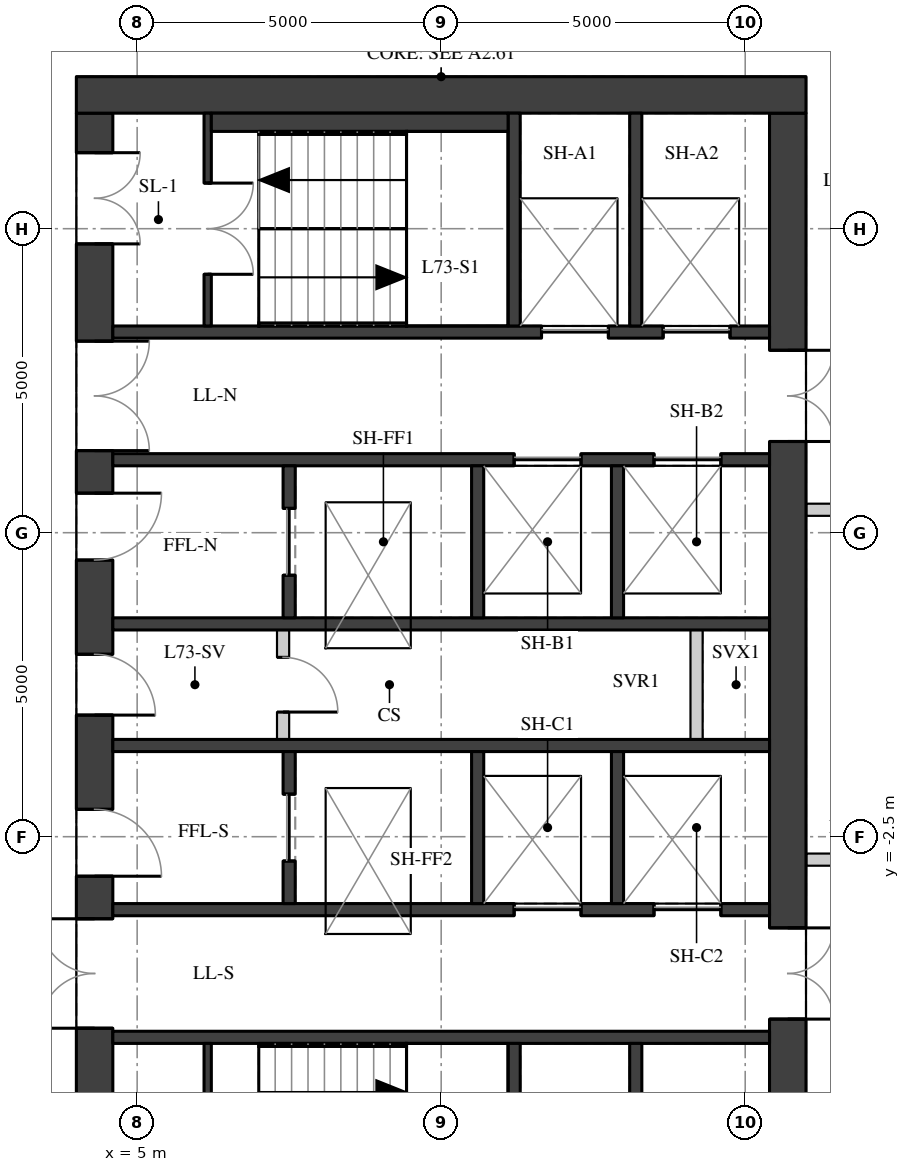
"""IFC4 building model, lengths in metres.
Left out: names, types, materials, properties, quantities, classifications, styles, units other than length and angle.
Written with IfcOpenShell. Run it as: python <this file> out.ifc"""

import sys

from ifc_helpers import new_model, si_unit, direction, frame, frame_2d, origin, place, context, subcontext, project, spatial, rectangle, extrude, element, fill, save


model = new_model("IFC4")
c1 = context("Model", 3, precision=1e-05, world=origin(), true_north=direction((0.0, 1.0)))
c2 = subcontext(c1, "Body", "Model", "MODEL_VIEW")
j1 = project(units=[si_unit("LENGTHUNIT", "METRE"), si_unit("PLANEANGLEUNIT", "RADIAN")], contexts=[c1])
p1 = place(None, origin())
s1 = spatial("IfcSite", under=j1, at=p1, CompositionType="ELEMENT")
p2 = place(p1, origin())
s2 = spatial("IfcBuilding", under=s1, at=p2, CompositionType="ELEMENT")
p3 = place(p2, frame((0.0, 0.0, 256.4)))
s3 = spatial("IfcBuildingStorey", under=s2, at=p3, CompositionType="ELEMENT", Elevation=256.4)
p4 = place(p3, frame((4.3, -9.4, 0.0), z_axis=(0.0, 0.0, 1.0), x_axis=(0.0, 1.0, 0.0)))
e1 = element("IfcWall", 1, at=p4, inside=s3, PredefinedType="SHEAR", context=c2, shape_type="SweptSolid", body=[
    extrude(rectangle(XDim=18.8, YDim=0.6, at=frame_2d((9.4, 0.0))), origin(), (0.0, 0.0, 1.0), 2.95),
])
p5 = place(p4, frame((0.65, 0.0, 0.0)))
e2 = element("IfcOpeningElement", 2, at=p5, cuts=e1, PredefinedType="OPENING", context=c2, shape_type="SweptSolid", body=[
    extrude(rectangle(XDim=1.5, YDim=2.1, at=frame_2d((0.75, 1.05))), frame((0.0, 0.31, 0.0), z_axis=(0.0, -1.0, 0.0), x_axis=(1.0, 0.0, 0.0)), (0.0, 0.0, 1.0), 0.62),
])
p6 = place(p4, frame((3.75, 0.0, 0.0)))
e3 = element("IfcOpeningElement", 3, at=p6, cuts=e1, PredefinedType="OPENING", context=c2, shape_type="SweptSolid", body=[
    extrude(rectangle(XDim=1.8, YDim=2.1, at=frame_2d((0.9, 1.05))), frame((0.0, 0.31, 0.0), z_axis=(0.0, -1.0, 0.0), x_axis=(1.0, 0.0, 0.0)), (0.0, 0.0, 1.0), 0.62),
])
p7 = place(p4, frame((6.25, 0.0, 0.0)))
e4 = element("IfcOpeningElement", 4, at=p7, cuts=e1, PredefinedType="OPENING", context=c2, shape_type="SweptSolid", body=[
    extrude(rectangle(XDim=1.1, YDim=2.1, at=frame_2d((0.55, 1.05))), frame((0.0, 0.31, 0.0), z_axis=(0.0, -1.0, 0.0), x_axis=(1.0, 0.0, 0.0)), (0.0, 0.0, 1.0), 0.62),
])
p8 = place(p4, frame((8.9, 0.0, 0.0)))
e5 = element("IfcOpeningElement", 5, at=p8, cuts=e1, PredefinedType="OPENING", context=c2, shape_type="SweptSolid", body=[
    extrude(rectangle(XDim=1.0, YDim=2.1, at=frame_2d((0.5, 1.05))), frame((0.0, 0.31, 0.0), z_axis=(0.0, -1.0, 0.0), x_axis=(1.0, 0.0, 0.0)), (0.0, 0.0, 1.0), 0.62),
])
p9 = place(p4, frame((11.45, 0.0, 0.0)))
e6 = element("IfcOpeningElement", 6, at=p9, cuts=e1, PredefinedType="OPENING", context=c2, shape_type="SweptSolid", body=[
    extrude(rectangle(XDim=1.1, YDim=2.1, at=frame_2d((0.55, 1.05))), frame((0.0, 0.31, 0.0), z_axis=(0.0, -1.0, 0.0), x_axis=(1.0, 0.0, 0.0)), (0.0, 0.0, 1.0), 0.62),
])
p10 = place(p4, frame((13.25, 0.0, 0.0)))
e7 = element("IfcOpeningElement", 7, at=p10, cuts=e1, PredefinedType="OPENING", context=c2, shape_type="SweptSolid", body=[
    extrude(rectangle(XDim=1.8, YDim=2.1, at=frame_2d((0.9, 1.05))), frame((0.0, 0.31, 0.0), z_axis=(0.0, -1.0, 0.0), x_axis=(1.0, 0.0, 0.0)), (0.0, 0.0, 1.0), 0.62),
])
p11 = place(p4, frame((16.65, 0.0, 0.0)))
e8 = element("IfcOpeningElement", 8, at=p11, cuts=e1, PredefinedType="OPENING", context=c2, shape_type="SweptSolid", body=[
    extrude(rectangle(XDim=1.5, YDim=2.1, at=frame_2d((0.75, 1.05))), frame((0.0, 0.31, 0.0), z_axis=(0.0, -1.0, 0.0), x_axis=(1.0, 0.0, 0.0)), (0.0, 0.0, 1.0), 0.62),
])
p12 = place(p3, frame((15.7, -9.4, 0.0), z_axis=(0.0, 0.0, 1.0), x_axis=(0.0, 1.0, 0.0)))
e9 = element("IfcWall", 9, at=p12, inside=s3, PredefinedType="SHEAR", context=c2, shape_type="SweptSolid", body=[
    extrude(rectangle(XDim=18.8, YDim=0.6, at=frame_2d((9.4, 0.0))), origin(), (0.0, 0.0, 1.0), 2.95),
])
p13 = place(p12, frame((13.4, 0.0, 0.0)))
e10 = element("IfcOpeningElement", 10, at=p13, cuts=e9, PredefinedType="OPENING", context=c2, shape_type="SweptSolid", body=[
    extrude(rectangle(XDim=1.5, YDim=2.1, at=frame_2d((0.75, 1.05))), frame((0.0, 0.31, 0.0), z_axis=(0.0, -1.0, 0.0), x_axis=(1.0, 0.0, 0.0)), (0.0, 0.0, 1.0), 0.62),
])
p14 = place(p12, frame((3.9, 0.0, 0.0)))
e11 = element("IfcOpeningElement", 11, at=p14, cuts=e9, PredefinedType="OPENING", context=c2, shape_type="SweptSolid", body=[
    extrude(rectangle(XDim=1.5, YDim=2.1, at=frame_2d((0.75, 1.05))), frame((0.0, 0.31, 0.0), z_axis=(0.0, -1.0, 0.0), x_axis=(1.0, 0.0, 0.0)), (0.0, 0.0, 1.0), 0.62),
])
p15 = place(p3, frame((4.0, 9.7, 0.0), z_axis=(0.0, 0.0, 1.0), x_axis=(1.0, 0.0, 0.0)))
e12 = element("IfcWall", 12, at=p15, inside=s3, PredefinedType="SHEAR", context=c2, shape_type="SweptSolid", body=[
    extrude(rectangle(XDim=12.0, YDim=0.6, at=frame_2d((6.0, 0.0))), origin(), (0.0, 0.0, 1.0), 2.95),
])
p16 = place(p3, frame((4.6, 5.8, 0.0), z_axis=(0.0, 0.0, 1.0), x_axis=(1.0, 0.0, 0.0)))
e13 = element("IfcWall", 13, at=p16, inside=s3, PredefinedType="SHEAR", context=c2, shape_type="SweptSolid", body=[
    extrude(rectangle(XDim=10.8, YDim=0.2, at=frame_2d((5.4, 0.0))), origin(), (0.0, 0.0, 1.0), 2.95),
])
p17 = place(p16, frame((7.05, 0.0, 0.0)))
e14 = element("IfcOpeningElement", 14, at=p17, cuts=e13, PredefinedType="OPENING", context=c2, shape_type="SweptSolid", body=[
    extrude(rectangle(XDim=1.1, YDim=2.1, at=frame_2d((0.55, 1.05))), frame((0.0, 0.11, 0.0), z_axis=(0.0, -1.0, 0.0), x_axis=(1.0, 0.0, 0.0)), (0.0, 0.0, 1.0), 0.22),
])
p18 = place(p16, frame((9.05, 0.0, 0.0)))
e15 = element("IfcOpeningElement", 15, at=p18, cuts=e13, PredefinedType="OPENING", context=c2, shape_type="SweptSolid", body=[
    extrude(rectangle(XDim=1.1, YDim=2.1, at=frame_2d((0.55, 1.05))), frame((0.0, 0.11, 0.0), z_axis=(0.0, -1.0, 0.0), x_axis=(1.0, 0.0, 0.0)), (0.0, 0.0, 1.0), 0.22),
])
p19 = place(p3, frame((4.6, 3.7, 0.0), z_axis=(0.0, 0.0, 1.0), x_axis=(1.0, 0.0, 0.0)))
e16 = element("IfcWall", 16, at=p19, inside=s3, PredefinedType="SHEAR", context=c2, shape_type="SweptSolid", body=[
    extrude(rectangle(XDim=10.8, YDim=0.2, at=frame_2d((5.4, 0.0))), origin(), (0.0, 0.0, 1.0), 2.95),
])
p20 = place(p19, frame((6.6, 0.0, 0.0)))
e17 = element("IfcOpeningElement", 17, at=p20, cuts=e16, PredefinedType="OPENING", context=c2, shape_type="SweptSolid", body=[
    extrude(rectangle(XDim=1.1, YDim=2.1, at=frame_2d((0.55, 1.05))), frame((0.0, 0.11, 0.0), z_axis=(0.0, -1.0, 0.0), x_axis=(1.0, 0.0, 0.0)), (0.0, 0.0, 1.0), 0.22),
])
p21 = place(p19, frame((8.9, 0.0, 0.0)))
e18 = element("IfcOpeningElement", 18, at=p21, cuts=e16, PredefinedType="OPENING", context=c2, shape_type="SweptSolid", body=[
    extrude(rectangle(XDim=1.1, YDim=2.1, at=frame_2d((0.55, 1.05))), frame((0.0, 0.11, 0.0), z_axis=(0.0, -1.0, 0.0), x_axis=(1.0, 0.0, 0.0)), (0.0, 0.0, 1.0), 0.22),
])
for number, where, z_axis, x_axis in (
    (19, (4.6, 1.0, 0.0), (0.0, 0.0, 1.0), (1.0, 0.0, 0.0)),
    (20, (4.6, -1.0, 0.0), (0.0, 0.0, 1.0), (1.0, 0.0, 0.0)),
):
    element("IfcWall", number, at=place(p3, frame(where, z_axis=z_axis, x_axis=x_axis)), inside=s3, PredefinedType="SHEAR", context=c2, shape_type="SweptSolid", body=[
        extrude(rectangle(XDim=10.8, YDim=0.2, at=frame_2d((5.4, 0.0))), origin(), (0.0, 0.0, 1.0), 2.95),
    ])
p22 = place(p3, frame((4.6, -3.7, 0.0), z_axis=(0.0, 0.0, 1.0), x_axis=(1.0, 0.0, 0.0)))
e21 = element("IfcWall", 21, at=p22, inside=s3, PredefinedType="SHEAR", context=c2, shape_type="SweptSolid", body=[
    extrude(rectangle(XDim=10.8, YDim=0.2, at=frame_2d((5.4, 0.0))), origin(), (0.0, 0.0, 1.0), 2.95),
])
p23 = place(p22, frame((6.6, 0.0, 0.0)))
e22 = element("IfcOpeningElement", 22, at=p23, cuts=e21, PredefinedType="OPENING", context=c2, shape_type="SweptSolid", body=[
    extrude(rectangle(XDim=1.1, YDim=2.1, at=frame_2d((0.55, 1.05))), frame((0.0, 0.11, 0.0), z_axis=(0.0, -1.0, 0.0), x_axis=(1.0, 0.0, 0.0)), (0.0, 0.0, 1.0), 0.22),
])
p24 = place(p22, frame((8.9, 0.0, 0.0)))
e23 = element("IfcOpeningElement", 23, at=p24, cuts=e21, PredefinedType="OPENING", context=c2, shape_type="SweptSolid", body=[
    extrude(rectangle(XDim=1.1, YDim=2.1, at=frame_2d((0.55, 1.05))), frame((0.0, 0.11, 0.0), z_axis=(0.0, -1.0, 0.0), x_axis=(1.0, 0.0, 0.0)), (0.0, 0.0, 1.0), 0.22),
])
p25 = place(p3, frame((4.6, -5.8, 0.0), z_axis=(0.0, 0.0, 1.0), x_axis=(1.0, 0.0, 0.0)))
e24 = element("IfcWall", 24, at=p25, inside=s3, PredefinedType="SHEAR", context=c2, shape_type="SweptSolid", body=[
    extrude(rectangle(XDim=10.8, YDim=0.2, at=frame_2d((5.4, 0.0))), origin(), (0.0, 0.0, 1.0), 2.95),
])
for number, where, z_axis, x_axis in (
    (25, (11.2, 5.9, 0.0), (0.0, 0.0, 1.0), (0.0, 1.0, 0.0)),
    (26, (11.2, -9.4, 0.0), (0.0, 0.0, 1.0), (0.0, 1.0, 0.0)),
    (27, (13.2, 5.9, 0.0), (0.0, 0.0, 1.0), (0.0, 1.0, 0.0)),
    (28, (13.2, -9.4, 0.0), (0.0, 0.0, 1.0), (0.0, 1.0, 0.0)),
):
    element("IfcWall", number, at=place(p3, frame(where, z_axis=z_axis, x_axis=x_axis)), inside=s3, PredefinedType="SHEAR", context=c2, shape_type="SweptSolid", body=[
        extrude(rectangle(XDim=3.5, YDim=0.2, at=frame_2d((1.75, 0.0))), origin(), (0.0, 0.0, 1.0), 2.95),
    ])
p26 = place(p3, frame((7.5, 1.1, 0.0), z_axis=(0.0, 0.0, 1.0), x_axis=(0.0, 1.0, 0.0)))
e29 = element("IfcWall", 29, at=p26, inside=s3, PredefinedType="SHEAR", context=c2, shape_type="SweptSolid", body=[
    extrude(rectangle(XDim=2.5, YDim=0.2, at=frame_2d((1.25, 0.0))), origin(), (0.0, 0.0, 1.0), 2.95),
])
p27 = place(p26, frame((0.7, 0.0, 0.0)))
e30 = element("IfcOpeningElement", 30, at=p27, cuts=e29, PredefinedType="OPENING", context=c2, shape_type="SweptSolid", body=[
    extrude(rectangle(XDim=1.1, YDim=2.1, at=frame_2d((0.55, 1.05))), frame((0.0, 0.11, 0.0), z_axis=(0.0, -1.0, 0.0), x_axis=(1.0, 0.0, 0.0)), (0.0, 0.0, 1.0), 0.22),
])
p28 = place(p3, frame((7.5, -3.6, 0.0), z_axis=(0.0, 0.0, 1.0), x_axis=(0.0, 1.0, 0.0)))
e31 = element("IfcWall", 31, at=p28, inside=s3, PredefinedType="SHEAR", context=c2, shape_type="SweptSolid", body=[
    extrude(rectangle(XDim=2.5, YDim=0.2, at=frame_2d((1.25, 0.0))), origin(), (0.0, 0.0, 1.0), 2.95),
])
p29 = place(p28, frame((0.7, 0.0, 0.0)))
e32 = element("IfcOpeningElement", 32, at=p29, cuts=e31, PredefinedType="OPENING", context=c2, shape_type="SweptSolid", body=[
    extrude(rectangle(XDim=1.1, YDim=2.1, at=frame_2d((0.55, 1.05))), frame((0.0, 0.11, 0.0), z_axis=(0.0, -1.0, 0.0), x_axis=(1.0, 0.0, 0.0)), (0.0, 0.0, 1.0), 0.22),
])
for number, where, z_axis, x_axis in (
    (33, (10.6, 1.1, 0.0), (0.0, 0.0, 1.0), (0.0, 1.0, 0.0)),
    (34, (10.6, -3.6, 0.0), (0.0, 0.0, 1.0), (0.0, 1.0, 0.0)),
    (35, (12.9, 1.1, 0.0), (0.0, 0.0, 1.0), (0.0, 1.0, 0.0)),
    (36, (12.9, -3.6, 0.0), (0.0, 0.0, 1.0), (0.0, 1.0, 0.0)),
):
    element("IfcWall", number, at=place(p3, frame(where, z_axis=z_axis, x_axis=x_axis)), inside=s3, PredefinedType="SHEAR", context=c2, shape_type="SweptSolid", body=[
        extrude(rectangle(XDim=2.5, YDim=0.2, at=frame_2d((1.25, 0.0))), origin(), (0.0, 0.0, 1.0), 2.95),
    ])
p30 = place(p3, frame((6.16, 5.9, 0.0), z_axis=(0.0, 0.0, 1.0), x_axis=(0.0, 1.0, 0.0)))
e37 = element("IfcWall", 37, at=p30, inside=s3, PredefinedType="SHEAR", context=c2, shape_type="SweptSolid", body=[
    extrude(rectangle(XDim=3.5, YDim=0.12, at=frame_2d((1.75, 0.0))), origin(), (0.0, 0.0, 1.0), 2.95),
])
p31 = place(p30, frame((0.85, 0.0, 0.0)))
e38 = element("IfcOpeningElement", 38, at=p31, cuts=e37, PredefinedType="OPENING", context=c2, shape_type="SweptSolid", body=[
    extrude(rectangle(XDim=1.5, YDim=2.1, at=frame_2d((0.75, 1.05))), frame((0.0, 0.07, 0.0), z_axis=(0.0, -1.0, 0.0), x_axis=(1.0, 0.0, 0.0)), (0.0, 0.0, 1.0), 0.14),
])
p32 = place(p3, frame((6.16, -9.4, 0.0), z_axis=(0.0, 0.0, 1.0), x_axis=(0.0, 1.0, 0.0)))
e39 = element("IfcWall", 39, at=p32, inside=s3, PredefinedType="SHEAR", context=c2, shape_type="SweptSolid", body=[
    extrude(rectangle(XDim=3.5, YDim=0.12, at=frame_2d((1.75, 0.0))), origin(), (0.0, 0.0, 1.0), 2.95),
])
p33 = place(p32, frame((1.15, 0.0, 0.0)))
e40 = element("IfcOpeningElement", 40, at=p33, cuts=e39, PredefinedType="OPENING", context=c2, shape_type="SweptSolid", body=[
    extrude(rectangle(XDim=1.5, YDim=2.1, at=frame_2d((0.75, 1.05))), frame((0.0, 0.07, 0.0), z_axis=(0.0, -1.0, 0.0), x_axis=(1.0, 0.0, 0.0)), (0.0, 0.0, 1.0), 0.14),
])
p34 = place(p3, frame((7.4, -0.9, 0.0), z_axis=(0.0, 0.0, 1.0), x_axis=(0.0, 1.0, 0.0)))
e41 = element("IfcWall", 41, at=p34, inside=s3, PredefinedType="PARTITIONING", context=c2, shape_type="SweptSolid", body=[
    extrude(rectangle(XDim=1.8, YDim=0.2, at=frame_2d((0.9, 0.0))), origin(), (0.0, 0.0, 1.0), 2.95),
])
p35 = place(p34, frame((0.45, 0.0, 0.0)))
e42 = element("IfcOpeningElement", 42, at=p35, cuts=e41, PredefinedType="OPENING", context=c2, shape_type="SweptSolid", body=[
    extrude(rectangle(XDim=0.9, YDim=2.1, at=frame_2d((0.45, 1.05))), frame((0.0, 0.11, 0.0), z_axis=(0.0, -1.0, 0.0), x_axis=(1.0, 0.0, 0.0)), (0.0, 0.0, 1.0), 0.22),
])
p36 = place(p3, frame((14.2, -0.9, 0.0), z_axis=(0.0, 0.0, 1.0), x_axis=(0.0, 1.0, 0.0)))
e43 = element("IfcWall", 43, at=p36, inside=s3, PredefinedType="PARTITIONING", context=c2, shape_type="SweptSolid", body=[
    extrude(rectangle(XDim=1.8, YDim=0.2, at=frame_2d((0.9, 0.0))), origin(), (0.0, 0.0, 1.0), 2.95),
])
p37 = place(p3, frame((6.22, 9.25, 0.0), z_axis=(0.0, 0.0, 1.0), x_axis=(1.0, 0.0, 0.0)))
e44 = element("IfcWall", 44, at=p37, inside=s3, PredefinedType="PARTITIONING", context=c2, shape_type="SweptSolid", body=[
    extrude(rectangle(XDim=4.88, YDim=0.3, at=frame_2d((2.44, 0.0))), origin(), (0.0, 0.0, 1.0), 2.95),
])
p38 = place(p3, frame((17.5, 2.877, 0.0), z_axis=(0.0, 0.0, 1.0), x_axis=(-1.0, 0.0, 0.0)))
e45 = element("IfcWall", 45, at=p38, inside=s3, PredefinedType="PARTITIONING", context=c2, shape_type="SweptSolid", body=[
    extrude(rectangle(XDim=1.496, YDim=0.2, at=frame_2d((0.748, 0.0))), origin(), (0.0, 0.0, 1.0), 2.95),
])
p39 = place(p3, frame((16.004, -2.877, 0.0), z_axis=(0.0, 0.0, 1.0), x_axis=(1.0, 0.0, 0.0)))
e46 = element("IfcWall", 46, at=p39, inside=s3, PredefinedType="PARTITIONING", context=c2, shape_type="SweptSolid", body=[
    extrude(rectangle(XDim=1.596, YDim=0.2, at=frame_2d((0.798, 0.0))), origin(), (0.0, 0.0, 1.0), 2.5),
])
p40 = place(p6, origin())
e47 = element("IfcDoor", 47, at=p40, inside=s3, OperationType="DOUBLE_DOOR_SINGLE_SWING", PredefinedType="DOOR", context=c2, shape_type="SweptSolid", body=[
    extrude(rectangle(XDim=1.8, YDim=2.1, at=frame_2d((0.9, 1.05))), frame((0.0, 0.025, 0.0), z_axis=(0.0, -1.0, 0.0), x_axis=(1.0, 0.0, 0.0)), (0.0, 0.0, 1.0), 0.05),
])
fill(e3, e47)
p41 = place(p7, origin())
e48 = element("IfcDoor", 48, at=p41, inside=s3, OperationType="SINGLE_SWING_RIGHT", PredefinedType="DOOR", context=c2, shape_type="SweptSolid", body=[
    extrude(rectangle(XDim=1.1, YDim=2.1, at=frame_2d((0.55, 1.05))), frame((0.0, 0.025, 0.0), z_axis=(0.0, -1.0, 0.0), x_axis=(1.0, 0.0, 0.0)), (0.0, 0.0, 1.0), 0.05),
])
fill(e4, e48)
p42 = place(p8, origin())
e49 = element("IfcDoor", 49, at=p42, inside=s3, OperationType="SINGLE_SWING_RIGHT", PredefinedType="DOOR", context=c2, shape_type="SweptSolid", body=[
    extrude(rectangle(XDim=1.0, YDim=2.1, at=frame_2d((0.5, 1.05))), frame((0.0, 0.025, 0.0), z_axis=(0.0, -1.0, 0.0), x_axis=(1.0, 0.0, 0.0)), (0.0, 0.0, 1.0), 0.05),
])
fill(e5, e49)
p43 = place(p9, origin())
e50 = element("IfcDoor", 50, at=p43, inside=s3, OperationType="SINGLE_SWING_LEFT", PredefinedType="DOOR", context=c2, shape_type="SweptSolid", body=[
    extrude(rectangle(XDim=1.1, YDim=2.1, at=frame_2d((0.55, 1.05))), frame((0.0, 0.025, 0.0), z_axis=(0.0, -1.0, 0.0), x_axis=(1.0, 0.0, 0.0)), (0.0, 0.0, 1.0), 0.05),
])
fill(e6, e50)
p44 = place(p10, origin())
e51 = element("IfcDoor", 51, at=p44, inside=s3, OperationType="DOUBLE_DOOR_SINGLE_SWING", PredefinedType="DOOR", context=c2, shape_type="SweptSolid", body=[
    extrude(rectangle(XDim=1.8, YDim=2.1, at=frame_2d((0.9, 1.05))), frame((0.0, 0.025, 0.0), z_axis=(0.0, -1.0, 0.0), x_axis=(1.0, 0.0, 0.0)), (0.0, 0.0, 1.0), 0.05),
])
fill(e7, e51)
p45 = place(p11, origin())
e52 = element("IfcDoor", 52, at=p45, inside=s3, OperationType="DOUBLE_DOOR_SINGLE_SWING", PredefinedType="DOOR", context=c2, shape_type="SweptSolid", body=[
    extrude(rectangle(XDim=1.5, YDim=2.1, at=frame_2d((0.75, 1.05))), frame((0.0, 0.025, 0.0), z_axis=(0.0, -1.0, 0.0), x_axis=(1.0, 0.0, 0.0)), (0.0, 0.0, 1.0), 0.05),
])
fill(e8, e52)
p46 = place(p13, origin())
e53 = element("IfcDoor", 53, at=p46, inside=s3, OperationType="DOUBLE_DOOR_SINGLE_SWING", PredefinedType="DOOR", context=c2, shape_type="SweptSolid", body=[
    extrude(rectangle(XDim=1.5, YDim=2.1, at=frame_2d((0.75, 1.05))), frame((0.0, 0.025, 0.0), z_axis=(0.0, -1.0, 0.0), x_axis=(1.0, 0.0, 0.0)), (0.0, 0.0, 1.0), 0.05),
])
fill(e10, e53)
p47 = place(p14, origin())
e54 = element("IfcDoor", 54, at=p47, inside=s3, OperationType="DOUBLE_DOOR_SINGLE_SWING", PredefinedType="DOOR", context=c2, shape_type="SweptSolid", body=[
    extrude(rectangle(XDim=1.5, YDim=2.1, at=frame_2d((0.75, 1.05))), frame((0.0, 0.025, 0.0), z_axis=(0.0, -1.0, 0.0), x_axis=(1.0, 0.0, 0.0)), (0.0, 0.0, 1.0), 0.05),
])
fill(e11, e54)
p48 = place(p31, origin())
e55 = element("IfcDoor", 55, at=p48, inside=s3, OperationType="DOUBLE_DOOR_SINGLE_SWING", PredefinedType="DOOR", context=c2, shape_type="SweptSolid", body=[
    extrude(rectangle(XDim=1.5, YDim=2.1, at=frame_2d((0.75, 1.05))), frame((0.0, 0.025, 0.0), z_axis=(0.0, -1.0, 0.0), x_axis=(1.0, 0.0, 0.0)), (0.0, 0.0, 1.0), 0.05),
])
fill(e38, e55)
p49 = place(p17, origin())
e56 = element("IfcDoor", 56, at=p49, inside=s3, OperationType="DOUBLE_DOOR_SLIDING", PredefinedType="DOOR", context=c2, shape_type="SweptSolid", body=[
    extrude(rectangle(XDim=1.1, YDim=2.1, at=frame_2d((0.55, 1.05))), frame((0.0, 0.025, 0.0), z_axis=(0.0, -1.0, 0.0), x_axis=(1.0, 0.0, 0.0)), (0.0, 0.0, 1.0), 0.05),
])
fill(e14, e56)
p50 = place(p18, origin())
e57 = element("IfcDoor", 57, at=p50, inside=s3, OperationType="DOUBLE_DOOR_SLIDING", PredefinedType="DOOR", context=c2, shape_type="SweptSolid", body=[
    extrude(rectangle(XDim=1.1, YDim=2.1, at=frame_2d((0.55, 1.05))), frame((0.0, 0.025, 0.0), z_axis=(0.0, -1.0, 0.0), x_axis=(1.0, 0.0, 0.0)), (0.0, 0.0, 1.0), 0.05),
])
fill(e15, e57)
p51 = place(p20, origin())
e58 = element("IfcDoor", 58, at=p51, inside=s3, OperationType="DOUBLE_DOOR_SLIDING", PredefinedType="DOOR", context=c2, shape_type="SweptSolid", body=[
    extrude(rectangle(XDim=1.1, YDim=2.1, at=frame_2d((0.55, 1.05))), frame((0.0, 0.025, 0.0), z_axis=(0.0, -1.0, 0.0), x_axis=(1.0, 0.0, 0.0)), (0.0, 0.0, 1.0), 0.05),
])
fill(e17, e58)
p52 = place(p21, origin())
e59 = element("IfcDoor", 59, at=p52, inside=s3, OperationType="DOUBLE_DOOR_SLIDING", PredefinedType="DOOR", context=c2, shape_type="SweptSolid", body=[
    extrude(rectangle(XDim=1.1, YDim=2.1, at=frame_2d((0.55, 1.05))), frame((0.0, 0.025, 0.0), z_axis=(0.0, -1.0, 0.0), x_axis=(1.0, 0.0, 0.0)), (0.0, 0.0, 1.0), 0.05),
])
fill(e18, e59)
p53 = place(p23, origin())
e60 = element("IfcDoor", 60, at=p53, inside=s3, OperationType="DOUBLE_DOOR_SLIDING", PredefinedType="DOOR", context=c2, shape_type="SweptSolid", body=[
    extrude(rectangle(XDim=1.1, YDim=2.1, at=frame_2d((0.55, 1.05))), frame((0.0, 0.025, 0.0), z_axis=(0.0, -1.0, 0.0), x_axis=(1.0, 0.0, 0.0)), (0.0, 0.0, 1.0), 0.05),
])
fill(e22, e60)
p54 = place(p24, origin())
e61 = element("IfcDoor", 61, at=p54, inside=s3, OperationType="DOUBLE_DOOR_SLIDING", PredefinedType="DOOR", context=c2, shape_type="SweptSolid", body=[
    extrude(rectangle(XDim=1.1, YDim=2.1, at=frame_2d((0.55, 1.05))), frame((0.0, 0.025, 0.0), z_axis=(0.0, -1.0, 0.0), x_axis=(1.0, 0.0, 0.0)), (0.0, 0.0, 1.0), 0.05),
])
fill(e23, e61)
p55 = place(p27, origin())
e62 = element("IfcDoor", 62, at=p55, inside=s3, OperationType="DOUBLE_DOOR_SLIDING", PredefinedType="DOOR", context=c2, shape_type="SweptSolid", body=[
    extrude(rectangle(XDim=1.1, YDim=2.1, at=frame_2d((0.55, 1.05))), frame((0.0, 0.025, 0.0), z_axis=(0.0, -1.0, 0.0), x_axis=(1.0, 0.0, 0.0)), (0.0, 0.0, 1.0), 0.05),
])
fill(e30, e62)
p56 = place(p29, origin())
e63 = element("IfcDoor", 63, at=p56, inside=s3, OperationType="DOUBLE_DOOR_SLIDING", PredefinedType="DOOR", context=c2, shape_type="SweptSolid", body=[
    extrude(rectangle(XDim=1.1, YDim=2.1, at=frame_2d((0.55, 1.05))), frame((0.0, 0.025, 0.0), z_axis=(0.0, -1.0, 0.0), x_axis=(1.0, 0.0, 0.0)), (0.0, 0.0, 1.0), 0.05),
])
fill(e32, e63)
p57 = place(p35, origin())
e64 = element("IfcDoor", 64, at=p57, inside=s3, OperationType="SINGLE_SWING_RIGHT", PredefinedType="DOOR", context=c2, shape_type="SweptSolid", body=[
    extrude(rectangle(XDim=0.9, YDim=2.1, at=frame_2d((0.45, 1.05))), frame((0.0, 0.025, 0.0), z_axis=(0.0, -1.0, 0.0), x_axis=(1.0, 0.0, 0.0)), (0.0, 0.0, 1.0), 0.05),
])
fill(e42, e64)
save(model, sys.argv[1])
